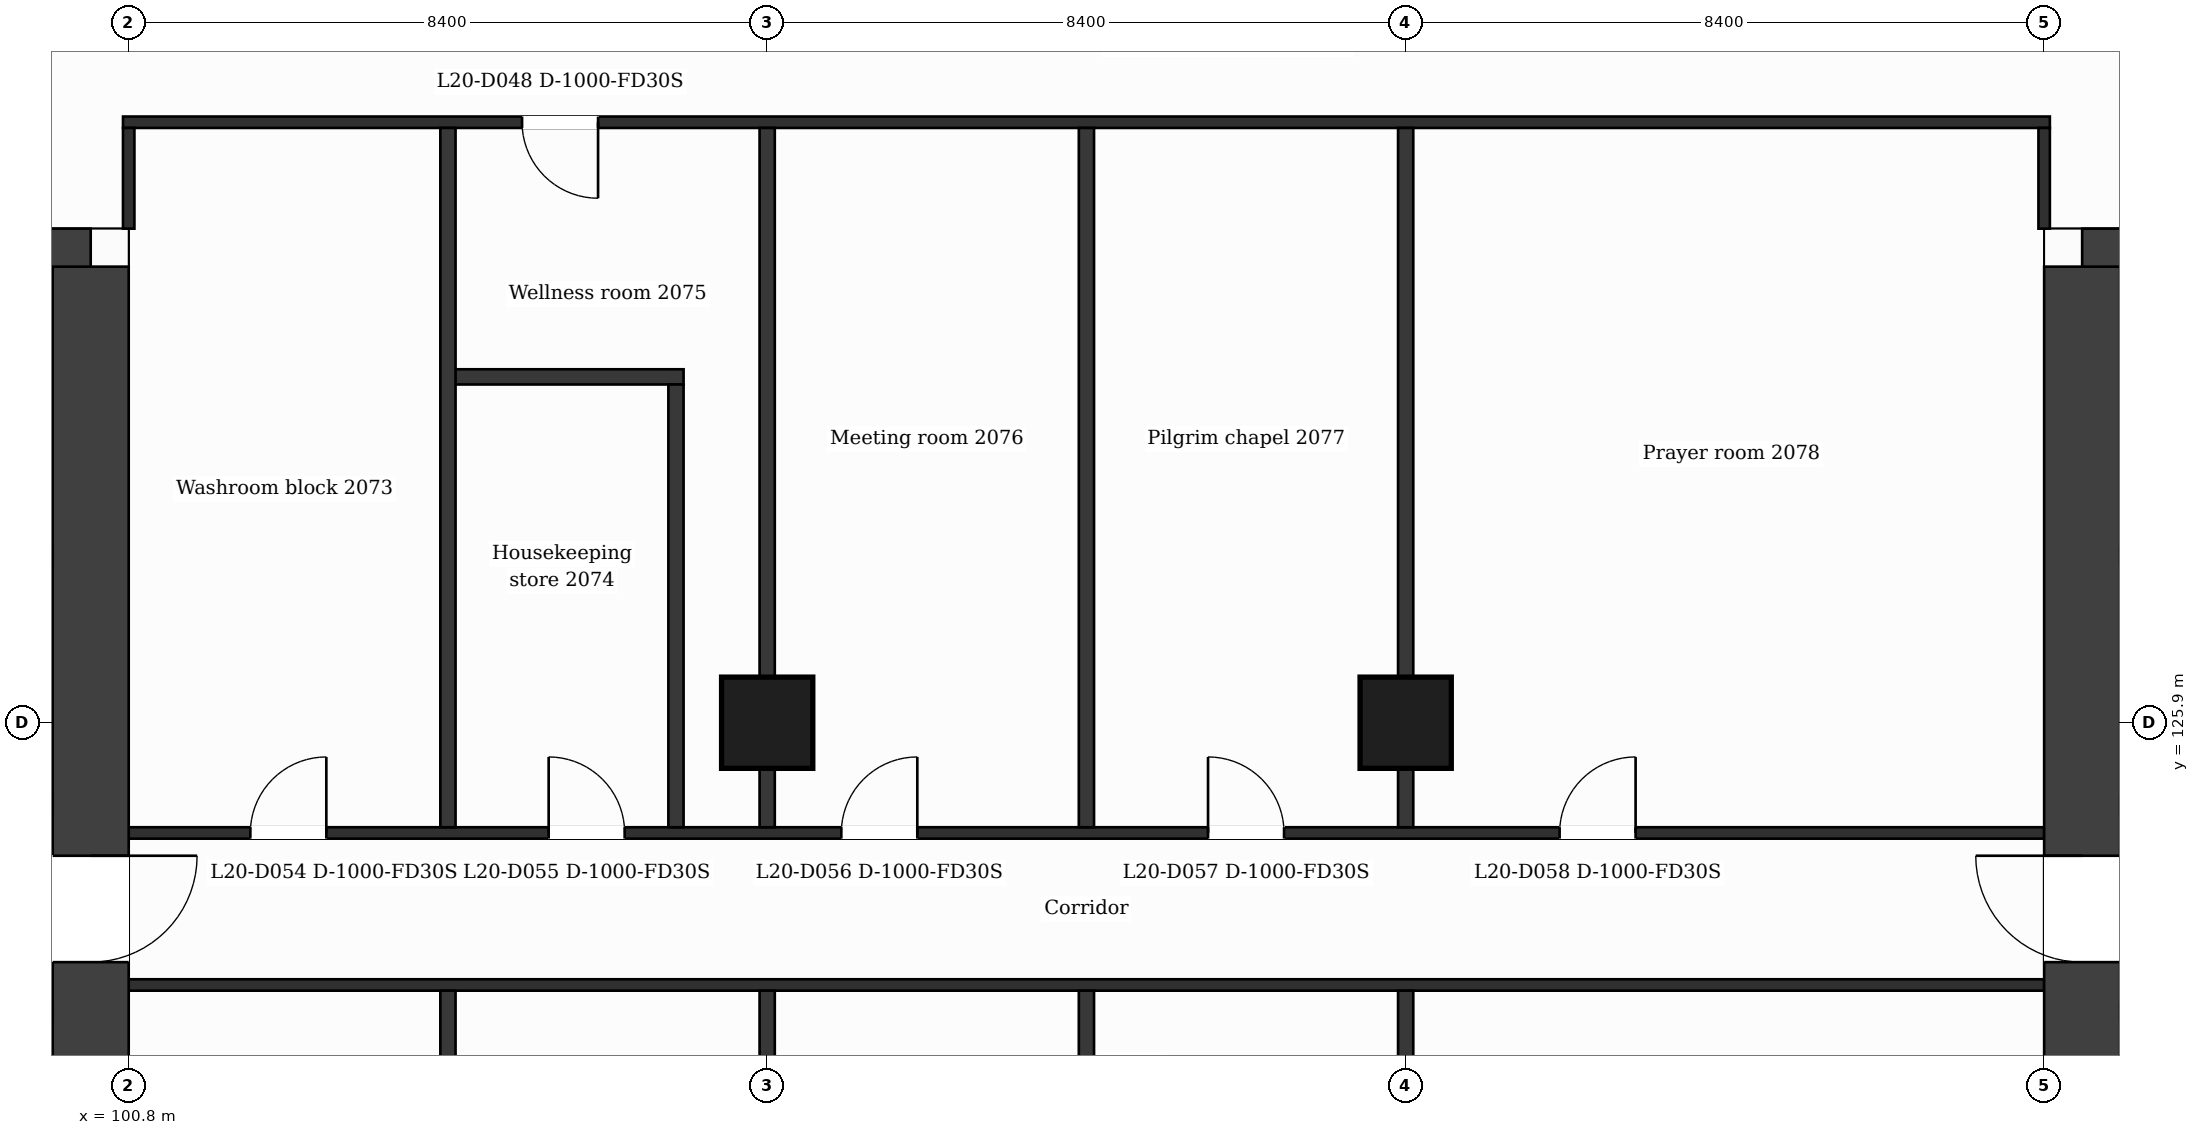
"""IFC4 building model, lengths in metres.
Left out: names, types, materials, properties, quantities, classifications, styles, units other than length and angle.
Written with IfcOpenShell. Run it as: python <this file> out.ifc"""

import sys

from ifc_helpers import new_model, si_unit, direction, frame, frame_2d, origin, origin_2d, place, context, subcontext, project, spatial, rectangle, extrude, element, fill, save


model = new_model("IFC4")
c1 = context("Model", 3, precision=1e-05, world=origin(), true_north=direction((0.0, 1.0)))
c2 = subcontext(c1, "Body", "Model", "MODEL_VIEW")
j1 = project(units=[si_unit("LENGTHUNIT", "METRE"), si_unit("PLANEANGLEUNIT", "RADIAN")], contexts=[c1])
p1 = place(None, origin())
s1 = spatial("IfcSite", under=j1, at=p1, CompositionType="ELEMENT")
p2 = place(p1, origin())
s2 = spatial("IfcBuilding", under=s1, at=p2, CompositionType="ELEMENT")
p3 = place(p2, frame((0.0, 0.0, 91.0)))
s3 = spatial("IfcBuildingStorey", under=s2, at=p3, CompositionType="ELEMENT", Elevation=91.0)
p4 = place(p3, frame((89.068, 131.9, 0.0), z_axis=(0.0, 0.0, 1.0), x_axis=(1.0, 0.0, 0.0)))
e1 = element("IfcWall", 1, at=p4, inside=s3, PredefinedType="SHEAR", context=c2, shape_type="SweptSolid", body=[
    extrude(rectangle(XDim=11.232, YDim=1.0, at=frame_2d((5.616, 0.0))), origin(), (0.0, 0.0, 1.0), 3.7),
])
p5 = place(p4, frame((6.646, 0.0, 0.0)))
e2 = element("IfcOpeningElement", 2, at=p5, cuts=e1, PredefinedType="OPENING", context=c2, shape_type="SweptSolid", body=[
    extrude(rectangle(XDim=1.2, YDim=2.1, at=frame_2d((0.6, 1.05))), frame((0.0, 0.51, 0.0), z_axis=(0.0, -1.0, 0.0), x_axis=(1.0, 0.0, 0.0)), (0.0, 0.0, 1.0), 1.02),
])
p6 = place(p3, frame((100.3, 131.9, 0.0), z_axis=(0.0, 0.0, 1.0), x_axis=(0.0, -1.0, 0.0)))
e3 = element("IfcWall", 3, at=p6, inside=s3, PredefinedType="SHEAR", context=c2, shape_type="SweptSolid", body=[
    extrude(rectangle(XDim=21.0, YDim=1.0, at=frame_2d((10.5, 0.0))), origin(), (0.0, 0.0, 1.0), 3.7),
])
p7 = place(p6, frame((7.75, 0.0, 0.0)))
e4 = element("IfcOpeningElement", 4, at=p7, cuts=e3, PredefinedType="OPENING", context=c2, shape_type="SweptSolid", body=[
    extrude(rectangle(XDim=1.4, YDim=2.1, at=frame_2d((0.7, 1.05))), frame((0.0, 0.51, 0.0), z_axis=(0.0, -1.0, 0.0), x_axis=(1.0, 0.0, 0.0)), (0.0, 0.0, 1.0), 1.02),
])
p8 = place(p3, frame((126.5, 131.9, 0.0), z_axis=(0.0, 0.0, 1.0), x_axis=(1.0, 0.0, 0.0)))
e5 = element("IfcWall", 5, at=p8, inside=s3, PredefinedType="SHEAR", context=c2, shape_type="SweptSolid", body=[
    extrude(rectangle(XDim=11.232, YDim=1.0, at=frame_2d((5.616, 0.0))), origin(), (0.0, 0.0, 1.0), 3.7),
])
p9 = place(p8, frame((3.386, 0.0, 0.0)))
e6 = element("IfcOpeningElement", 6, at=p9, cuts=e5, PredefinedType="OPENING", context=c2, shape_type="SweptSolid", body=[
    extrude(rectangle(XDim=1.2, YDim=2.1, at=frame_2d((0.6, 1.05))), frame((0.0, 0.51, 0.0), z_axis=(0.0, -1.0, 0.0), x_axis=(1.0, 0.0, 0.0)), (0.0, 0.0, 1.0), 1.02),
])
p10 = place(p3, frame((126.5, 110.9, 0.0), z_axis=(0.0, 0.0, 1.0), x_axis=(0.0, 1.0, 0.0)))
e7 = element("IfcWall", 7, at=p10, inside=s3, PredefinedType="SHEAR", context=c2, shape_type="SweptSolid", body=[
    extrude(rectangle(XDim=21.0, YDim=1.0, at=frame_2d((10.5, 0.0))), origin(), (0.0, 0.0, 1.0), 3.7),
])
p11 = place(p10, frame((11.85, 0.0, 0.0)))
e8 = element("IfcOpeningElement", 8, at=p11, cuts=e7, PredefinedType="OPENING", context=c2, shape_type="SweptSolid", body=[
    extrude(rectangle(XDim=1.4, YDim=2.1, at=frame_2d((0.7, 1.05))), frame((0.0, 0.51, 0.0), z_axis=(0.0, -1.0, 0.0), x_axis=(1.0, 0.0, 0.0)), (0.0, 0.0, 1.0), 1.02),
])
for number, where, z_axis, x_axis in (
    (9, (109.2, 125.9, 0.0), (0.0, 0.0, 1.0), (1.0, 0.0, 0.0)),
    (10, (117.6, 125.9, 0.0), (0.0, 0.0, 1.0), (1.0, 0.0, 0.0)),
):
    element("IfcColumn", number, at=place(p3, frame(where, z_axis=z_axis, x_axis=x_axis)), inside=s3, PredefinedType="COLUMN", context=c2, shape_type="SweptSolid", body=[
        extrude(rectangle(XDim=1.2, YDim=1.2, at=origin_2d()), origin(), (0.0, 0.0, 1.0), 3.7),
    ])
p12 = place(p3, frame((95.227, 122.1, 0.0), z_axis=(0.0, 0.0, 1.0), x_axis=(1.0, 0.0, 0.0)))
e11 = element("IfcWall", 11, at=p12, inside=s3, PredefinedType="PARTITIONING", context=c2, shape_type="SweptSolid", body=[
    extrude(rectangle(XDim=4.573, YDim=0.2, at=frame_2d((2.287, 0.0))), origin(), (0.0, 0.0, 1.0), 3.38),
])
p13 = place(p12, frame((0.522, 0.0, 0.0)))
e12 = element("IfcOpeningElement", 12, at=p13, cuts=e11, PredefinedType="OPENING", context=c2, shape_type="SweptSolid", body=[
    extrude(rectangle(XDim=0.9, YDim=2.1, at=frame_2d((0.45, 1.05))), frame((0.0, 0.11, 0.0), z_axis=(0.0, -1.0, 0.0), x_axis=(1.0, 0.0, 0.0)), (0.0, 0.0, 1.0), 0.22),
])
p14 = place(p12, frame((2.98, 0.0, 0.0)))
e13 = element("IfcOpeningElement", 13, at=p14, cuts=e11, PredefinedType="OPENING", context=c2, shape_type="SweptSolid", body=[
    extrude(rectangle(XDim=0.9, YDim=2.1, at=frame_2d((0.45, 1.05))), frame((0.0, 0.11, 0.0), z_axis=(0.0, -1.0, 0.0), x_axis=(1.0, 0.0, 0.0)), (0.0, 0.0, 1.0), 0.22),
])
p15 = place(p3, frame((100.8, 122.45, 0.0), z_axis=(0.0, 0.0, 1.0), x_axis=(1.0, 0.0, 0.0)))
e14 = element("IfcWall", 14, at=p15, inside=s3, PredefinedType="PARTITIONING", context=c2, shape_type="SweptSolid", body=[
    extrude(rectangle(XDim=25.2, YDim=0.15, at=frame_2d((12.6, 0.0))), origin(), (0.0, 0.0, 1.0), 3.38),
])
p16 = place(p3, frame((100.8, 124.45, 0.0), z_axis=(0.0, 0.0, 1.0), x_axis=(1.0, 0.0, 0.0)))
e15 = element("IfcWall", 15, at=p16, inside=s3, PredefinedType="PARTITIONING", context=c2, shape_type="SweptSolid", body=[
    extrude(rectangle(XDim=25.2, YDim=0.15, at=frame_2d((12.6, 0.0))), origin(), (0.0, 0.0, 1.0), 3.38),
])
p17 = place(p16, frame((1.6, 0.0, 0.0)))
e16 = element("IfcOpeningElement", 16, at=p17, cuts=e15, PredefinedType="OPENING", context=c2, shape_type="SweptSolid", body=[
    extrude(rectangle(XDim=1.0, YDim=2.1, at=frame_2d((0.5, 1.05))), frame((0.0, 0.085, 0.0), z_axis=(0.0, -1.0, 0.0), x_axis=(1.0, 0.0, 0.0)), (0.0, 0.0, 1.0), 0.17),
])
p18 = place(p16, frame((5.525, 0.0, 0.0)))
e17 = element("IfcOpeningElement", 17, at=p18, cuts=e15, PredefinedType="OPENING", context=c2, shape_type="SweptSolid", body=[
    extrude(rectangle(XDim=1.0, YDim=2.1, at=frame_2d((0.5, 1.05))), frame((0.0, 0.085, 0.0), z_axis=(0.0, -1.0, 0.0), x_axis=(1.0, 0.0, 0.0)), (0.0, 0.0, 1.0), 0.17),
])
p19 = place(p16, frame((9.375, 0.0, 0.0)))
e18 = element("IfcOpeningElement", 18, at=p19, cuts=e15, PredefinedType="OPENING", context=c2, shape_type="SweptSolid", body=[
    extrude(rectangle(XDim=1.0, YDim=2.1, at=frame_2d((0.5, 1.05))), frame((0.0, 0.085, 0.0), z_axis=(0.0, -1.0, 0.0), x_axis=(1.0, 0.0, 0.0)), (0.0, 0.0, 1.0), 0.17),
])
p20 = place(p16, frame((14.2, 0.0, 0.0)))
e19 = element("IfcOpeningElement", 19, at=p20, cuts=e15, PredefinedType="OPENING", context=c2, shape_type="SweptSolid", body=[
    extrude(rectangle(XDim=1.0, YDim=2.1, at=frame_2d((0.5, 1.05))), frame((0.0, 0.085, 0.0), z_axis=(0.0, -1.0, 0.0), x_axis=(1.0, 0.0, 0.0)), (0.0, 0.0, 1.0), 0.17),
])
p21 = place(p16, frame((18.825, 0.0, 0.0)))
e20 = element("IfcOpeningElement", 20, at=p21, cuts=e15, PredefinedType="OPENING", context=c2, shape_type="SweptSolid", body=[
    extrude(rectangle(XDim=1.0, YDim=2.1, at=frame_2d((0.5, 1.05))), frame((0.0, 0.085, 0.0), z_axis=(0.0, -1.0, 0.0), x_axis=(1.0, 0.0, 0.0)), (0.0, 0.0, 1.0), 0.17),
])
p22 = place(p3, frame((127.0, 124.8, 0.0), z_axis=(0.0, 0.0, 1.0), x_axis=(1.0, 0.0, 0.0)))
e21 = element("IfcWall", 21, at=p22, inside=s3, PredefinedType="PARTITIONING", context=c2, shape_type="SweptSolid", body=[
    extrude(rectangle(XDim=4.649, YDim=0.2, at=frame_2d((2.324, 0.0))), origin(), (0.0, 0.0, 1.0), 3.38),
])
p23 = place(p22, frame((0.56, 0.0, 0.0)))
e22 = element("IfcOpeningElement", 22, at=p23, cuts=e21, PredefinedType="OPENING", context=c2, shape_type="SweptSolid", body=[
    extrude(rectangle(XDim=1.1, YDim=2.1, at=frame_2d((0.55, 1.05))), frame((0.0, 0.11, 0.0), z_axis=(0.0, -1.0, 0.0), x_axis=(1.0, 0.0, 0.0)), (0.0, 0.0, 1.0), 0.22),
])
p24 = place(p3, frame((127.0, 128.1, 0.0), z_axis=(0.0, 0.0, 1.0), x_axis=(1.0, 0.0, 0.0)))
e23 = element("IfcWall", 23, at=p24, inside=s3, PredefinedType="PARTITIONING", context=c2, shape_type="SweptSolid", body=[
    extrude(rectangle(XDim=4.649, YDim=0.2, at=frame_2d((2.324, 0.0))), origin(), (0.0, 0.0, 1.0), 3.38),
])
p25 = place(p24, frame((2.884, 0.0, 0.0)))
e24 = element("IfcOpeningElement", 24, at=p25, cuts=e23, PredefinedType="OPENING", context=c2, shape_type="SweptSolid", body=[
    extrude(rectangle(XDim=1.1, YDim=2.1, at=frame_2d((0.55, 1.05))), frame((0.0, 0.11, 0.0), z_axis=(0.0, -1.0, 0.0), x_axis=(1.0, 0.0, 0.0)), (0.0, 0.0, 1.0), 0.22),
])
p26 = place(p3, frame((105.0, 130.45, 0.0), z_axis=(0.0, 0.0, 1.0), x_axis=(1.0, 0.0, 0.0)))
e25 = element("IfcWall", 25, at=p26, inside=s3, PredefinedType="PARTITIONING", context=c2, shape_type="SweptSolid", body=[
    extrude(rectangle(XDim=3.1, YDim=0.2, at=frame_2d((1.55, 0.0))), origin(), (0.0, 0.0, 1.0), 3.38),
])
p27 = place(p3, frame((100.725, 133.8, 0.0), z_axis=(0.0, 0.0, 1.0), x_axis=(1.0, 0.0, 0.0)))
e26 = element("IfcWall", 26, at=p27, inside=s3, PredefinedType="PARTITIONING", context=c2, shape_type="SweptSolid", body=[
    extrude(rectangle(XDim=25.35, YDim=0.15, at=frame_2d((12.675, 0.0))), origin(), (0.0, 0.0, 1.0), 3.38),
])
p28 = place(p27, frame((5.25, 0.0, 0.0)))
e27 = element("IfcOpeningElement", 27, at=p28, cuts=e26, PredefinedType="OPENING", context=c2, shape_type="SweptSolid", body=[
    extrude(rectangle(XDim=1.0, YDim=2.1, at=frame_2d((0.5, 1.05))), frame((0.0, 0.085, 0.0), z_axis=(0.0, -1.0, 0.0), x_axis=(1.0, 0.0, 0.0)), (0.0, 0.0, 1.0), 0.17),
])
p29 = place(p3, frame((100.8, 132.4, 0.0), z_axis=(0.0, 0.0, 1.0), x_axis=(0.0, 1.0, 0.0)))
e28 = element("IfcWall", 28, at=p29, inside=s3, PredefinedType="PARTITIONING", context=c2, shape_type="SweptSolid", body=[
    extrude(rectangle(XDim=1.325, YDim=0.15, at=frame_2d((0.663, 0.0))), origin(), (0.0, 0.0, 1.0), 3.38),
])
p30 = place(p3, frame((105.0, 109.075, 0.0), z_axis=(0.0, 0.0, 1.0), x_axis=(0.0, 1.0, 0.0)))
e29 = element("IfcWall", 29, at=p30, inside=s3, PredefinedType="PARTITIONING", context=c2, shape_type="SweptSolid", body=[
    extrude(rectangle(XDim=13.3, YDim=0.2, at=frame_2d((6.65, 0.0))), origin(), (0.0, 0.0, 1.0), 3.38),
])
p31 = place(p3, frame((105.0, 124.525, 0.0), z_axis=(0.0, 0.0, 1.0), x_axis=(0.0, 1.0, 0.0)))
e30 = element("IfcWall", 30, at=p31, inside=s3, PredefinedType="PARTITIONING", context=c2, shape_type="SweptSolid", body=[
    extrude(rectangle(XDim=9.2, YDim=0.2, at=frame_2d((4.6, 0.0))), origin(), (0.0, 0.0, 1.0), 3.38),
])
p32 = place(p3, frame((108.0, 124.525, 0.0), z_axis=(0.0, 0.0, 1.0), x_axis=(0.0, 1.0, 0.0)))
e31 = element("IfcWall", 31, at=p32, inside=s3, PredefinedType="PARTITIONING", context=c2, shape_type="SweptSolid", body=[
    extrude(rectangle(XDim=5.825, YDim=0.2, at=frame_2d((2.913, 0.0))), origin(), (0.0, 0.0, 1.0), 3.38),
])
p33 = place(p3, frame((109.2, 109.075, 0.0), z_axis=(0.0, 0.0, 1.0), x_axis=(0.0, 1.0, 0.0)))
e32 = element("IfcWall", 32, at=p33, inside=s3, PredefinedType="PARTITIONING", context=c2, shape_type="SweptSolid", body=[
    extrude(rectangle(XDim=13.3, YDim=0.2, at=frame_2d((6.65, 0.0))), origin(), (0.0, 0.0, 1.0), 3.38),
])
p34 = place(p3, frame((109.2, 124.525, 0.0), z_axis=(0.0, 0.0, 1.0), x_axis=(0.0, 1.0, 0.0)))
e33 = element("IfcWall", 33, at=p34, inside=s3, PredefinedType="PARTITIONING", context=c2, shape_type="SweptSolid", body=[
    extrude(rectangle(XDim=9.2, YDim=0.2, at=frame_2d((4.6, 0.0))), origin(), (0.0, 0.0, 1.0), 3.38),
])
p35 = place(p3, frame((113.4, 109.075, 0.0), z_axis=(0.0, 0.0, 1.0), x_axis=(0.0, 1.0, 0.0)))
e34 = element("IfcWall", 34, at=p35, inside=s3, PredefinedType="PARTITIONING", context=c2, shape_type="SweptSolid", body=[
    extrude(rectangle(XDim=13.3, YDim=0.2, at=frame_2d((6.65, 0.0))), origin(), (0.0, 0.0, 1.0), 3.38),
])
p36 = place(p3, frame((113.4, 124.525, 0.0), z_axis=(0.0, 0.0, 1.0), x_axis=(0.0, 1.0, 0.0)))
e35 = element("IfcWall", 35, at=p36, inside=s3, PredefinedType="PARTITIONING", context=c2, shape_type="SweptSolid", body=[
    extrude(rectangle(XDim=9.2, YDim=0.2, at=frame_2d((4.6, 0.0))), origin(), (0.0, 0.0, 1.0), 3.38),
])
p37 = place(p3, frame((117.6, 109.075, 0.0), z_axis=(0.0, 0.0, 1.0), x_axis=(0.0, 1.0, 0.0)))
e36 = element("IfcWall", 36, at=p37, inside=s3, PredefinedType="PARTITIONING", context=c2, shape_type="SweptSolid", body=[
    extrude(rectangle(XDim=13.3, YDim=0.2, at=frame_2d((6.65, 0.0))), origin(), (0.0, 0.0, 1.0), 3.38),
])
p38 = place(p3, frame((117.6, 124.525, 0.0), z_axis=(0.0, 0.0, 1.0), x_axis=(0.0, 1.0, 0.0)))
e37 = element("IfcWall", 37, at=p38, inside=s3, PredefinedType="PARTITIONING", context=c2, shape_type="SweptSolid", body=[
    extrude(rectangle(XDim=9.2, YDim=0.2, at=frame_2d((4.6, 0.0))), origin(), (0.0, 0.0, 1.0), 3.38),
])
p39 = place(p3, frame((126.0, 132.4, 0.0), z_axis=(0.0, 0.0, 1.0), x_axis=(0.0, 1.0, 0.0)))
e38 = element("IfcWall", 38, at=p39, inside=s3, PredefinedType="PARTITIONING", context=c2, shape_type="SweptSolid", body=[
    extrude(rectangle(XDim=1.325, YDim=0.15, at=frame_2d((0.663, 0.0))), origin(), (0.0, 0.0, 1.0), 3.38),
])
p40 = place(p28, origin())
e39 = element("IfcDoor", 39, at=p40, inside=s3, OperationType="SINGLE_SWING_RIGHT", PredefinedType="DOOR", context=c2, shape_type="SweptSolid", body=[
    extrude(rectangle(XDim=1.0, YDim=2.1, at=frame_2d((0.5, 1.05))), frame((0.0, 0.025, 0.0), z_axis=(0.0, -1.0, 0.0), x_axis=(1.0, 0.0, 0.0)), (0.0, 0.0, 1.0), 0.05),
])
fill(e27, e39)
p41 = place(p17, origin())
e40 = element("IfcDoor", 40, at=p41, inside=s3, OperationType="SINGLE_SWING_RIGHT", PredefinedType="DOOR", context=c2, shape_type="SweptSolid", body=[
    extrude(rectangle(XDim=1.0, YDim=2.1, at=frame_2d((0.5, 1.05))), frame((0.0, 0.025, 0.0), z_axis=(0.0, -1.0, 0.0), x_axis=(1.0, 0.0, 0.0)), (0.0, 0.0, 1.0), 0.05),
])
fill(e16, e40)
p42 = place(p18, origin())
e41 = element("IfcDoor", 41, at=p42, inside=s3, OperationType="SINGLE_SWING_LEFT", PredefinedType="DOOR", context=c2, shape_type="SweptSolid", body=[
    extrude(rectangle(XDim=1.0, YDim=2.1, at=frame_2d((0.5, 1.05))), frame((0.0, 0.025, 0.0), z_axis=(0.0, -1.0, 0.0), x_axis=(1.0, 0.0, 0.0)), (0.0, 0.0, 1.0), 0.05),
])
fill(e17, e41)
p43 = place(p19, origin())
e42 = element("IfcDoor", 42, at=p43, inside=s3, OperationType="SINGLE_SWING_RIGHT", PredefinedType="DOOR", context=c2, shape_type="SweptSolid", body=[
    extrude(rectangle(XDim=1.0, YDim=2.1, at=frame_2d((0.5, 1.05))), frame((0.0, 0.025, 0.0), z_axis=(0.0, -1.0, 0.0), x_axis=(1.0, 0.0, 0.0)), (0.0, 0.0, 1.0), 0.05),
])
fill(e18, e42)
p44 = place(p20, origin())
e43 = element("IfcDoor", 43, at=p44, inside=s3, OperationType="SINGLE_SWING_LEFT", PredefinedType="DOOR", context=c2, shape_type="SweptSolid", body=[
    extrude(rectangle(XDim=1.0, YDim=2.1, at=frame_2d((0.5, 1.05))), frame((0.0, 0.025, 0.0), z_axis=(0.0, -1.0, 0.0), x_axis=(1.0, 0.0, 0.0)), (0.0, 0.0, 1.0), 0.05),
])
fill(e19, e43)
p45 = place(p21, origin())
e44 = element("IfcDoor", 44, at=p45, inside=s3, OperationType="SINGLE_SWING_RIGHT", PredefinedType="DOOR", context=c2, shape_type="SweptSolid", body=[
    extrude(rectangle(XDim=1.0, YDim=2.1, at=frame_2d((0.5, 1.05))), frame((0.0, 0.025, 0.0), z_axis=(0.0, -1.0, 0.0), x_axis=(1.0, 0.0, 0.0)), (0.0, 0.0, 1.0), 0.05),
])
fill(e20, e44)
p46 = place(p7, origin())
e45 = element("IfcDoor", 45, at=p46, inside=s3, OperationType="SINGLE_SWING_LEFT", PredefinedType="DOOR", context=c2, shape_type="SweptSolid", body=[
    extrude(rectangle(XDim=1.4, YDim=2.1, at=frame_2d((0.7, 1.05))), frame((0.0, 0.025, 0.0), z_axis=(0.0, -1.0, 0.0), x_axis=(1.0, 0.0, 0.0)), (0.0, 0.0, 1.0), 0.05),
])
fill(e4, e45)
p47 = place(p11, origin())
e46 = element("IfcDoor", 46, at=p47, inside=s3, OperationType="SINGLE_SWING_RIGHT", PredefinedType="DOOR", context=c2, shape_type="SweptSolid", body=[
    extrude(rectangle(XDim=1.4, YDim=2.1, at=frame_2d((0.7, 1.05))), frame((0.0, 0.025, 0.0), z_axis=(0.0, -1.0, 0.0), x_axis=(1.0, 0.0, 0.0)), (0.0, 0.0, 1.0), 0.05),
])
fill(e8, e46)
save(model, sys.argv[1])
